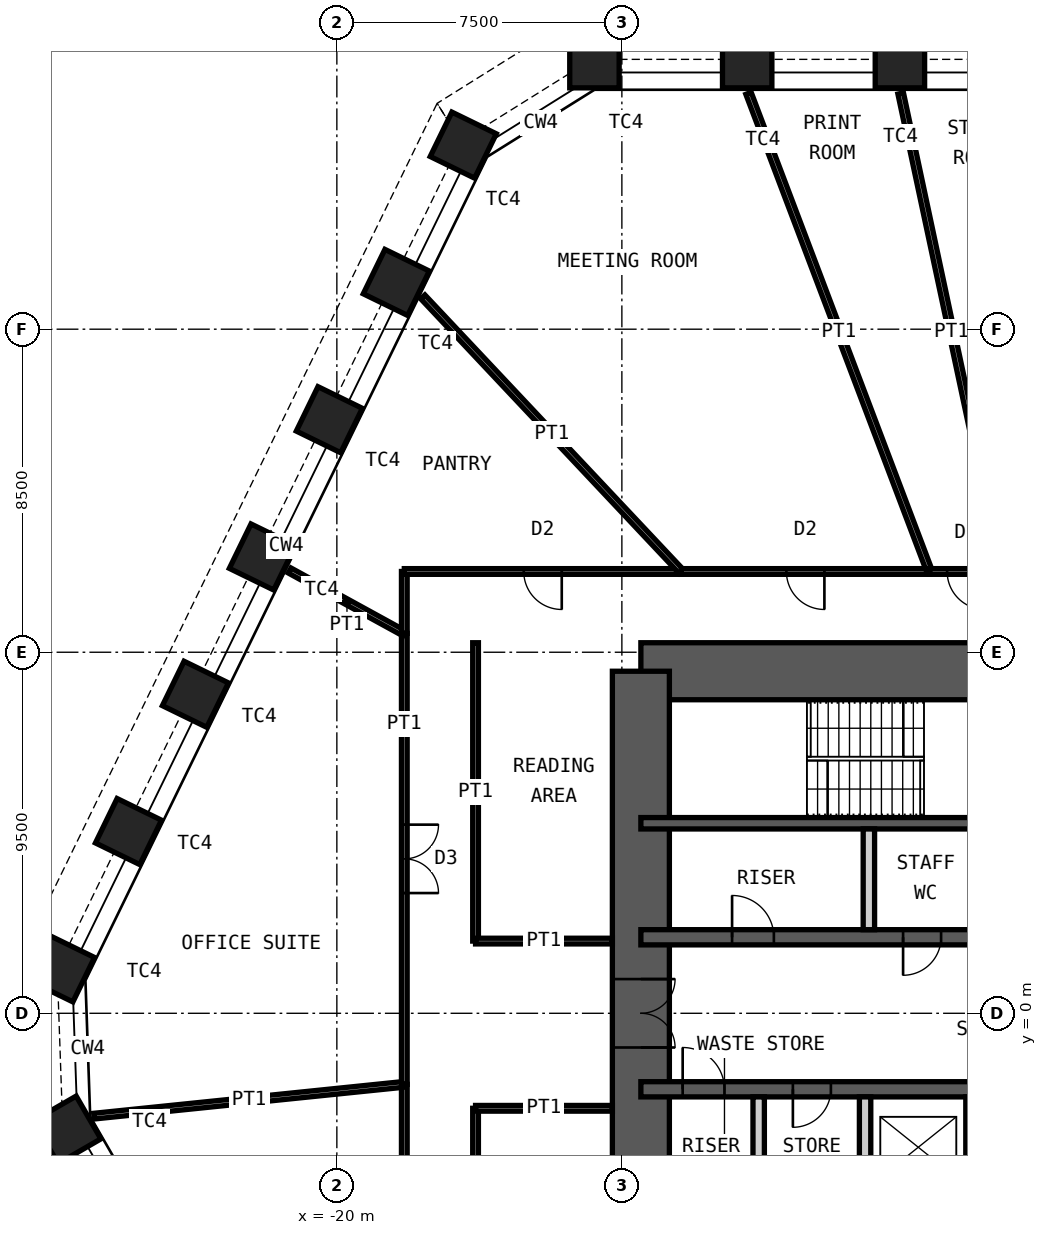
"""IFC4 building model, lengths in metres.
Left out: names, types, materials, properties, quantities, classifications, styles, units other than length and angle.
Written with IfcOpenShell. Run it as: python <this file> out.ifc"""

import sys

from ifc_helpers import new_model, si_unit, direction, frame, frame_2d, origin, origin_2d, place, context, subcontext, project, spatial, rectangle, hollow_rectangle, extrude, element, fill, save


model = new_model("IFC4")
c1 = context("Model", 3, precision=1e-05, world=origin(), true_north=direction((0.0, 1.0)))
c2 = subcontext(c1, "Body", "Model", "MODEL_VIEW")
j1 = project(units=[si_unit("LENGTHUNIT", "METRE"), si_unit("PLANEANGLEUNIT", "RADIAN")], contexts=[c1])
p1 = place(None, origin())
s1 = spatial("IfcSite", under=j1, at=p1, CompositionType="ELEMENT")
p2 = place(p1, origin())
s2 = spatial("IfcBuilding", under=s1, at=p2, CompositionType="ELEMENT")
p3 = place(p2, frame((0.0, 0.0, 140.8)))
s3 = spatial("IfcBuildingStorey", under=s2, at=p3, CompositionType="ELEMENT", Elevation=140.8)
for number, where, z_axis, x_axis in (
    (1, (-13.222, 25.0, 0.0), (0.0, 0.0, 1.0), (-1.0, 0.0, 0.0)),
    (2, (-9.203, 25.0, 0.0), (0.0, 0.0, 1.0), (-1.0, 0.0, 0.0)),
    (3, (-5.184, 25.0, 0.0), (0.0, 0.0, 1.0), (-1.0, 0.0, 0.0)),
    (4, (-27.097, -3.067, 0.0), (0.0, 0.0, 1.0), (0.5, -0.866, 0.0)),
    (5, (-27.245, 1.169, 0.0), (0.0, 0.0, 1.0), (-0.438, -0.899, 0.0)),
    (6, (-25.483, 4.781, 0.0), (0.0, 0.0, 1.0), (-0.438, -0.899, 0.0)),
    (7, (-23.721, 8.394, 0.0), (0.0, 0.0, 1.0), (-0.438, -0.899, 0.0)),
    (8, (-21.959, 12.006, 0.0), (0.0, 0.0, 1.0), (-0.438, -0.899, 0.0)),
    (9, (-20.198, 15.618, 0.0), (0.0, 0.0, 1.0), (-0.438, -0.899, 0.0)),
    (10, (-18.436, 19.23, 0.0), (0.0, 0.0, 1.0), (-0.438, -0.899, 0.0)),
    (11, (-16.674, 22.843, 0.0), (0.0, 0.0, 1.0), (-0.438, -0.899, 0.0)),
):
    element("IfcColumn", number, at=place(p3, frame(where, z_axis=z_axis, x_axis=x_axis)), inside=s3, PredefinedType="COLUMN", context=c2, shape_type="SweptSolid", body=[
        extrude(hollow_rectangle(XDim=1.3, YDim=1.3, WallThickness=0.1, at=origin_2d()), origin(), (0.0, 0.0, 1.0), 4.2),
    ])
p4 = place(p3, frame((-12.0, 9.0, 0.0), z_axis=(0.0, 0.0, 1.0), x_axis=(1.0, 0.0, 0.0)))
e12 = element("IfcWall", 12, at=p4, inside=s3, PredefinedType="SHEAR", context=c2, shape_type="SweptSolid", body=[
    extrude(rectangle(XDim=24.0, YDim=1.5, at=frame_2d((12.0, 0.0))), origin(), (0.0, 0.0, 1.0), 4.2),
])
p5 = place(p4, frame((10.4, 0.0, 0.0)))
e13 = element("IfcOpeningElement", 13, at=p5, cuts=e12, PredefinedType="OPENING", context=c2, shape_type="SweptSolid", body=[
    extrude(rectangle(XDim=1.0, YDim=2.1, at=frame_2d((0.5, 1.05))), frame((0.0, 0.76, 0.0), z_axis=(0.0, -1.0, 0.0), x_axis=(1.0, 0.0, 0.0)), (0.0, 0.0, 1.0), 1.52),
])
p6 = place(p4, frame((17.6, 0.0, 0.0)))
e14 = element("IfcOpeningElement", 14, at=p6, cuts=e12, PredefinedType="OPENING", context=c2, shape_type="SweptSolid", body=[
    extrude(rectangle(XDim=0.9, YDim=2.1, at=frame_2d((0.45, 1.05))), frame((0.0, 0.76, 0.0), z_axis=(0.0, -1.0, 0.0), x_axis=(1.0, 0.0, 0.0)), (0.0, 0.0, 1.0), 1.52),
])
p7 = place(p4, frame((21.9, 0.0, 0.0)))
e15 = element("IfcOpeningElement", 15, at=p7, cuts=e12, PredefinedType="OPENING", context=c2, shape_type="SweptSolid", body=[
    extrude(rectangle(XDim=0.9, YDim=2.1, at=frame_2d((0.45, 1.05))), frame((0.0, 0.76, 0.0), z_axis=(0.0, -1.0, 0.0), x_axis=(1.0, 0.0, 0.0)), (0.0, 0.0, 1.0), 1.52),
])
p8 = place(p3, frame((-12.0, -9.0, 0.0), z_axis=(0.0, 0.0, 1.0), x_axis=(0.0, 1.0, 0.0)))
e16 = element("IfcWall", 16, at=p8, inside=s3, PredefinedType="SHEAR", context=c2, shape_type="SweptSolid", body=[
    extrude(rectangle(XDim=18.0, YDim=1.5, at=frame_2d((9.0, 0.0))), origin(), (0.0, 0.0, 1.0), 4.2),
])
p9 = place(p8, frame((8.1, 0.0, 0.0)))
e17 = element("IfcOpeningElement", 17, at=p9, cuts=e16, PredefinedType="OPENING", context=c2, shape_type="SweptSolid", body=[
    extrude(rectangle(XDim=1.8, YDim=2.1, at=frame_2d((0.9, 1.05))), frame((0.0, 0.76, 0.0), z_axis=(0.0, -1.0, 0.0), x_axis=(1.0, 0.0, 0.0)), (0.0, 0.0, 1.0), 1.52),
])
p10 = place(p3, frame((-12.0, 5.0, 0.0), z_axis=(0.0, 0.0, 1.0), x_axis=(1.0, 0.0, 0.0)))
e18 = element("IfcWall", 18, at=p10, inside=s3, PredefinedType="SHEAR", context=c2, shape_type="SweptSolid", body=[
    extrude(rectangle(XDim=24.0, YDim=0.3, at=frame_2d((12.0, 0.0))), origin(), (0.0, 0.0, 1.0), 4.2),
])
p11 = place(p3, frame((-12.0, 2.0, 0.0), z_axis=(0.0, 0.0, 1.0), x_axis=(1.0, 0.0, 0.0)))
e19 = element("IfcWall", 19, at=p11, inside=s3, PredefinedType="SHEAR", context=c2, shape_type="SweptSolid", body=[
    extrude(rectangle(XDim=24.0, YDim=0.4, at=frame_2d((12.0, 0.0))), origin(), (0.0, 0.0, 1.0), 4.2),
])
p12 = place(p11, frame((2.4, 0.0, 0.0)))
e20 = element("IfcOpeningElement", 20, at=p12, cuts=e19, PredefinedType="OPENING", context=c2, shape_type="SweptSolid", body=[
    extrude(rectangle(XDim=1.1, YDim=2.1, at=frame_2d((0.55, 1.05))), frame((0.0, 0.21, 0.0), z_axis=(0.0, -1.0, 0.0), x_axis=(1.0, 0.0, 0.0)), (0.0, 0.0, 1.0), 0.42),
])
p13 = place(p11, frame((22.0, 0.0, 0.0)))
e21 = element("IfcOpeningElement", 21, at=p13, cuts=e19, PredefinedType="OPENING", context=c2, shape_type="SweptSolid", body=[
    extrude(rectangle(XDim=1.1, YDim=2.1, at=frame_2d((0.55, 1.05))), frame((0.0, 0.21, 0.0), z_axis=(0.0, -1.0, 0.0), x_axis=(1.0, 0.0, 0.0)), (0.0, 0.0, 1.0), 0.42),
])
p14 = place(p11, frame((10.15, 0.0, 0.0)))
e22 = element("IfcOpeningElement", 22, at=p14, cuts=e19, PredefinedType="OPENING", context=c2, shape_type="SweptSolid", body=[
    extrude(rectangle(XDim=1.0, YDim=2.1, at=frame_2d((0.5, 1.05))), frame((0.0, 0.21, 0.0), z_axis=(0.0, -1.0, 0.0), x_axis=(1.0, 0.0, 0.0)), (0.0, 0.0, 1.0), 0.42),
])
p15 = place(p11, frame((6.9, 0.0, 0.0)))
e23 = element("IfcOpeningElement", 23, at=p15, cuts=e19, PredefinedType="OPENING", context=c2, shape_type="SweptSolid", body=[
    extrude(rectangle(XDim=1.0, YDim=2.1, at=frame_2d((0.5, 1.05))), frame((0.0, 0.21, 0.0), z_axis=(0.0, -1.0, 0.0), x_axis=(1.0, 0.0, 0.0)), (0.0, 0.0, 1.0), 0.42),
])
p16 = place(p11, frame((13.35, 0.0, 0.0)))
e24 = element("IfcOpeningElement", 24, at=p16, cuts=e19, PredefinedType="OPENING", context=c2, shape_type="SweptSolid", body=[
    extrude(rectangle(XDim=1.1, YDim=2.4, at=frame_2d((0.55, 1.2))), frame((0.0, 0.21, 0.0), z_axis=(0.0, -1.0, 0.0), x_axis=(1.0, 0.0, 0.0)), (0.0, 0.0, 1.0), 0.42),
])
p17 = place(p11, frame((16.15, 0.0, 0.0)))
e25 = element("IfcOpeningElement", 25, at=p17, cuts=e19, PredefinedType="OPENING", context=c2, shape_type="SweptSolid", body=[
    extrude(rectangle(XDim=1.1, YDim=2.4, at=frame_2d((0.55, 1.2))), frame((0.0, 0.21, 0.0), z_axis=(0.0, -1.0, 0.0), x_axis=(1.0, 0.0, 0.0)), (0.0, 0.0, 1.0), 0.42),
])
p18 = place(p11, frame((18.95, 0.0, 0.0)))
e26 = element("IfcOpeningElement", 26, at=p18, cuts=e19, PredefinedType="OPENING", context=c2, shape_type="SweptSolid", body=[
    extrude(rectangle(XDim=1.1, YDim=2.4, at=frame_2d((0.55, 1.2))), frame((0.0, 0.21, 0.0), z_axis=(0.0, -1.0, 0.0), x_axis=(1.0, 0.0, 0.0)), (0.0, 0.0, 1.0), 0.42),
])
p19 = place(p3, frame((-12.0, -2.0, 0.0), z_axis=(0.0, 0.0, 1.0), x_axis=(1.0, 0.0, 0.0)))
e27 = element("IfcWall", 27, at=p19, inside=s3, PredefinedType="SHEAR", context=c2, shape_type="SweptSolid", body=[
    extrude(rectangle(XDim=24.0, YDim=0.4, at=frame_2d((12.0, 0.0))), origin(), (0.0, 0.0, 1.0), 4.2),
])
p20 = place(p19, frame((1.1, 0.0, 0.0)))
e28 = element("IfcOpeningElement", 28, at=p20, cuts=e27, PredefinedType="OPENING", context=c2, shape_type="SweptSolid", body=[
    extrude(rectangle(XDim=1.1, YDim=2.1, at=frame_2d((0.55, 1.05))), frame((0.0, 0.21, 0.0), z_axis=(0.0, -1.0, 0.0), x_axis=(1.0, 0.0, 0.0)), (0.0, 0.0, 1.0), 0.42),
])
p21 = place(p19, frame((13.55, 0.0, 0.0)))
e29 = element("IfcOpeningElement", 29, at=p21, cuts=e27, PredefinedType="OPENING", context=c2, shape_type="SweptSolid", body=[
    extrude(rectangle(XDim=1.1, YDim=2.1, at=frame_2d((0.55, 1.05))), frame((0.0, 0.21, 0.0), z_axis=(0.0, -1.0, 0.0), x_axis=(1.0, 0.0, 0.0)), (0.0, 0.0, 1.0), 0.42),
])
p22 = place(p19, frame((20.7, 0.0, 0.0)))
e30 = element("IfcOpeningElement", 30, at=p22, cuts=e27, PredefinedType="OPENING", context=c2, shape_type="SweptSolid", body=[
    extrude(rectangle(XDim=1.1, YDim=2.1, at=frame_2d((0.55, 1.05))), frame((0.0, 0.21, 0.0), z_axis=(0.0, -1.0, 0.0), x_axis=(1.0, 0.0, 0.0)), (0.0, 0.0, 1.0), 0.42),
])
p23 = place(p19, frame((4.0, 0.0, 0.0)))
e31 = element("IfcOpeningElement", 31, at=p23, cuts=e27, PredefinedType="OPENING", context=c2, shape_type="SweptSolid", body=[
    extrude(rectangle(XDim=1.0, YDim=2.1, at=frame_2d((0.5, 1.05))), frame((0.0, 0.21, 0.0), z_axis=(0.0, -1.0, 0.0), x_axis=(1.0, 0.0, 0.0)), (0.0, 0.0, 1.0), 0.42),
])
for number, where, z_axis, x_axis in (
    (32, (-6.0, 2.2, 0.0), (0.0, 0.0, 1.0), (0.0, 1.0, 0.0)),
    (33, (-8.9, -4.85, 0.0), (0.0, 0.0, 1.0), (0.0, 1.0, 0.0)),
    (34, (-6.1, -4.85, 0.0), (0.0, 0.0, 1.0), (0.0, 1.0, 0.0)),
    (35, (-3.3, -4.85, 0.0), (0.0, 0.0, 1.0), (0.0, 1.0, 0.0)),
):
    element("IfcWall", number, at=place(p3, frame(where, z_axis=z_axis, x_axis=x_axis)), inside=s3, PredefinedType="PARTITIONING", context=c2, shape_type="SweptSolid", body=[
        extrude(rectangle(XDim=2.65, YDim=0.3, at=frame_2d((1.325, 0.0))), origin(), (0.0, 0.0, 1.0), 3.98),
    ])
p24 = place(p3, frame((-18.225, -11.625, 0.0), z_axis=(0.0, 0.0, 1.0), x_axis=(0.0, 1.0, 0.0)))
e36 = element("IfcWall", 36, at=p24, inside=s3, PredefinedType="PARTITIONING", context=c2, shape_type="SweptSolid", body=[
    extrude(rectangle(XDim=9.756, YDim=0.15, at=frame_2d((4.878, 0.0))), origin(), (0.0, 0.0, 1.0), 4.03),
])
p25 = place(p24, frame((3.978, 0.0, 0.0)))
e37 = element("IfcOpeningElement", 37, at=p25, cuts=e36, PredefinedType="OPENING", context=c2, shape_type="SweptSolid", body=[
    extrude(rectangle(XDim=1.8, YDim=2.4, at=frame_2d((0.9, 1.2))), frame((0.0, 0.085, 0.0), z_axis=(0.0, -1.0, 0.0), x_axis=(1.0, 0.0, 0.0)), (0.0, 0.0, 1.0), 0.17),
])
p26 = place(p3, frame((-26.391, -2.706, 0.0), z_axis=(0.0, 0.0, 1.0), x_axis=(0.994783450774, 0.102009245004, 0.0)))
e38 = element("IfcWall", 38, at=p26, inside=s3, PredefinedType="PARTITIONING", context=c2, shape_type="SweptSolid", body=[
    extrude(rectangle(XDim=8.209, YDim=0.15, at=frame_2d((4.104, 0.0))), origin(), (0.0, 0.0, 1.0), 2.93),
])
p27 = place(p3, frame((-18.225, -1.869, 0.0), z_axis=(0.0, 0.0, 1.0), x_axis=(0.0, 1.0, 0.0)))
e39 = element("IfcWall", 39, at=p27, inside=s3, PredefinedType="PARTITIONING", context=c2, shape_type="SweptSolid", body=[
    extrude(rectangle(XDim=11.865, YDim=0.15, at=frame_2d((5.932, 0.0))), origin(), (0.0, 0.0, 1.0), 4.03),
])
p28 = place(p27, frame((5.032, 0.0, 0.0)))
e40 = element("IfcOpeningElement", 40, at=p28, cuts=e39, PredefinedType="OPENING", context=c2, shape_type="SweptSolid", body=[
    extrude(rectangle(XDim=1.8, YDim=2.4, at=frame_2d((0.9, 1.2))), frame((0.0, 0.085, 0.0), z_axis=(0.0, -1.0, 0.0), x_axis=(1.0, 0.0, 0.0)), (0.0, 0.0, 1.0), 0.17),
])
p29 = place(p3, frame((-21.242, 11.651, 0.0), z_axis=(0.0, 0.0, 1.0), x_axis=(0.876768023831, -0.480913539409, 0.0)))
e41 = element("IfcWall", 41, at=p29, inside=s3, PredefinedType="PARTITIONING", context=c2, shape_type="SweptSolid", body=[
    extrude(rectangle(XDim=3.441, YDim=0.15, at=frame_2d((1.721, 0.0))), origin(), (0.0, 0.0, 1.0), 3.33),
])
p30 = place(p3, frame((-18.225, 9.996, 0.0), z_axis=(0.0, 0.0, 1.0), x_axis=(0.0, 1.0, 0.0)))
e42 = element("IfcWall", 42, at=p30, inside=s3, PredefinedType="PARTITIONING", context=c2, shape_type="SweptSolid", body=[
    extrude(rectangle(XDim=1.629, YDim=0.15, at=frame_2d((0.814, 0.0))), origin(), (0.0, 0.0, 1.0), 4.03),
])
p31 = place(p3, frame((-18.225, 11.625, 0.0), z_axis=(0.0, 0.0, 1.0), x_axis=(1.0, 0.0, 0.0)))
e43 = element("IfcWall", 43, at=p31, inside=s3, PredefinedType="PARTITIONING", context=c2, shape_type="SweptSolid", body=[
    extrude(rectangle(XDim=7.286, YDim=0.15, at=frame_2d((3.643, 0.0))), origin(), (0.0, 0.0, 1.0), 4.03),
])
p32 = place(p31, frame((3.143, 0.0, 0.0)))
e44 = element("IfcOpeningElement", 44, at=p32, cuts=e43, PredefinedType="OPENING", context=c2, shape_type="SweptSolid", body=[
    extrude(rectangle(XDim=1.0, YDim=2.4, at=frame_2d((0.5, 1.2))), frame((0.0, 0.085, 0.0), z_axis=(0.0, -1.0, 0.0), x_axis=(1.0, 0.0, 0.0)), (0.0, 0.0, 1.0), 0.17),
])
p33 = place(p3, frame((-17.738, 18.851, 0.0), z_axis=(0.0, 0.0, 1.0), x_axis=(0.685286406267, -0.728273672039, 0.0)))
e45 = element("IfcWall", 45, at=p33, inside=s3, PredefinedType="PARTITIONING", context=c2, shape_type="SweptSolid", body=[
    extrude(rectangle(XDim=9.922, YDim=0.15, at=frame_2d((4.961, 0.0))), origin(), (0.0, 0.0, 1.0), 3.33),
])
p34 = place(p3, frame((-10.939, 11.625, 0.0), z_axis=(0.0, 0.0, 1.0), x_axis=(1.0, 0.0, 0.0)))
e46 = element("IfcWall", 46, at=p34, inside=s3, PredefinedType="PARTITIONING", context=c2, shape_type="SweptSolid", body=[
    extrude(rectangle(XDim=6.536, YDim=0.15, at=frame_2d((3.268, 0.0))), origin(), (0.0, 0.0, 1.0), 4.03),
])
p35 = place(p34, frame((2.768, 0.0, 0.0)))
e47 = element("IfcOpeningElement", 47, at=p35, cuts=e46, PredefinedType="OPENING", context=c2, shape_type="SweptSolid", body=[
    extrude(rectangle(XDim=1.0, YDim=2.4, at=frame_2d((0.5, 1.2))), frame((0.0, 0.085, 0.0), z_axis=(0.0, -1.0, 0.0), x_axis=(1.0, 0.0, 0.0)), (0.0, 0.0, 1.0), 0.17),
])
p36 = place(p3, frame((-9.167, 24.207, 0.0), z_axis=(0.0, 0.0, 1.0), x_axis=(0.354156368181, -0.935186220427, 0.0)))
e48 = element("IfcWall", 48, at=p36, inside=s3, PredefinedType="PARTITIONING", context=c2, shape_type="SweptSolid", body=[
    extrude(rectangle(XDim=13.454, YDim=0.15, at=frame_2d((6.727, 0.0))), origin(), (0.0, 0.0, 1.0), 3.33),
])
p37 = place(p3, frame((-4.403, 11.625, 0.0), z_axis=(0.0, 0.0, 1.0), x_axis=(1.0, 0.0, 0.0)))
e49 = element("IfcWall", 49, at=p37, inside=s3, PredefinedType="PARTITIONING", context=c2, shape_type="SweptSolid", body=[
    extrude(rectangle(XDim=1.923, YDim=0.15, at=frame_2d((0.961, 0.0))), origin(), (0.0, 0.0, 1.0), 4.03),
])
p38 = place(p37, frame((0.461, 0.0, 0.0)))
e50 = element("IfcOpeningElement", 50, at=p38, cuts=e49, PredefinedType="OPENING", context=c2, shape_type="SweptSolid", body=[
    extrude(rectangle(XDim=1.0, YDim=2.4, at=frame_2d((0.5, 1.2))), frame((0.0, 0.085, 0.0), z_axis=(0.0, -1.0, 0.0), x_axis=(1.0, 0.0, 0.0)), (0.0, 0.0, 1.0), 0.17),
])
p39 = place(p3, frame((-5.163, 24.202, 0.0), z_axis=(0.0, 0.0, 1.0), x_axis=(0.208618861146, -0.977997019819, 0.0)))
e51 = element("IfcWall", 51, at=p39, inside=s3, PredefinedType="PARTITIONING", context=c2, shape_type="SweptSolid", body=[
    extrude(rectangle(XDim=12.86, YDim=0.15, at=frame_2d((6.43, 0.0))), origin(), (0.0, 0.0, 1.0), 3.33),
])
p40 = place(p3, frame((-16.35, 1.9, 0.0), z_axis=(0.0, 0.0, 1.0), x_axis=(0.0, 1.0, 0.0)))
e52 = element("IfcWall", 52, at=p40, inside=s3, PredefinedType="PARTITIONING", context=c2, shape_type="SweptSolid", body=[
    extrude(rectangle(XDim=7.85, YDim=0.15, at=frame_2d((3.925, 0.0))), origin(), (0.0, 0.0, 1.0), 4.03),
])
p41 = place(p3, frame((-12.75, 1.9, 0.0), z_axis=(0.0, 0.0, 1.0), x_axis=(-1.0, 0.0, 0.0)))
e53 = element("IfcWall", 53, at=p41, inside=s3, PredefinedType="PARTITIONING", context=c2, shape_type="SweptSolid", body=[
    extrude(rectangle(XDim=3.6, YDim=0.15, at=frame_2d((1.8, 0.0))), origin(), (0.0, 0.0, 1.0), 3.33),
])
p42 = place(p3, frame((-16.35, -9.75, 0.0), z_axis=(0.0, 0.0, 1.0), x_axis=(0.0, 1.0, 0.0)))
e54 = element("IfcWall", 54, at=p42, inside=s3, PredefinedType="PARTITIONING", context=c2, shape_type="SweptSolid", body=[
    extrude(rectangle(XDim=7.25, YDim=0.15, at=frame_2d((3.625, 0.0))), origin(), (0.0, 0.0, 1.0), 4.03),
])
p43 = place(p3, frame((-12.75, -2.5, 0.0), z_axis=(0.0, 0.0, 1.0), x_axis=(-1.0, 0.0, 0.0)))
e55 = element("IfcWall", 55, at=p43, inside=s3, PredefinedType="PARTITIONING", context=c2, shape_type="SweptSolid", body=[
    extrude(rectangle(XDim=3.6, YDim=0.15, at=frame_2d((1.8, 0.0))), origin(), (0.0, 0.0, 1.0), 3.33),
])
p44 = place(p12, origin())
e56 = element("IfcDoor", 56, at=p44, inside=s3, OperationType="SINGLE_SWING_RIGHT", PredefinedType="DOOR", context=c2, shape_type="SweptSolid", body=[
    extrude(rectangle(XDim=1.1, YDim=2.1, at=frame_2d((0.55, 1.05))), frame((0.0, 0.025, 0.0), z_axis=(0.0, -1.0, 0.0), x_axis=(1.0, 0.0, 0.0)), (0.0, 0.0, 1.0), 0.05),
])
fill(e20, e56)
p45 = place(p20, origin())
e57 = element("IfcDoor", 57, at=p45, inside=s3, OperationType="SINGLE_SWING_RIGHT", PredefinedType="DOOR", context=c2, shape_type="SweptSolid", body=[
    extrude(rectangle(XDim=1.1, YDim=2.1, at=frame_2d((0.55, 1.05))), frame((0.0, 0.025, 0.0), z_axis=(0.0, -1.0, 0.0), x_axis=(1.0, 0.0, 0.0)), (0.0, 0.0, 1.0), 0.05),
])
fill(e28, e57)
p46 = place(p9, origin())
e58 = element("IfcDoor", 58, at=p46, inside=s3, OperationType="DOUBLE_DOOR_DOUBLE_SWING", PredefinedType="DOOR", context=c2, shape_type="SweptSolid", body=[
    extrude(rectangle(XDim=1.8, YDim=2.1, at=frame_2d((0.9, 1.05))), frame((0.0, 0.025, 0.0), z_axis=(0.0, -1.0, 0.0), x_axis=(1.0, 0.0, 0.0)), (0.0, 0.0, 1.0), 0.05),
])
fill(e17, e58)
p47 = place(p15, origin())
e59 = element("IfcDoor", 59, at=p47, inside=s3, OperationType="SINGLE_SWING_LEFT", PredefinedType="DOOR", context=c2, shape_type="SweptSolid", body=[
    extrude(rectangle(XDim=1.0, YDim=2.1, at=frame_2d((0.5, 1.05))), frame((0.0, 0.025, 0.0), z_axis=(0.0, -1.0, 0.0), x_axis=(1.0, 0.0, 0.0)), (0.0, 0.0, 1.0), 0.05),
])
fill(e23, e59)
p48 = place(p23, origin())
e60 = element("IfcDoor", 60, at=p48, inside=s3, OperationType="SINGLE_SWING_LEFT", PredefinedType="DOOR", context=c2, shape_type="SweptSolid", body=[
    extrude(rectangle(XDim=1.0, YDim=2.1, at=frame_2d((0.5, 1.05))), frame((0.0, 0.025, 0.0), z_axis=(0.0, -1.0, 0.0), x_axis=(1.0, 0.0, 0.0)), (0.0, 0.0, 1.0), 0.05),
])
fill(e31, e60)
p49 = place(p28, origin())
e61 = element("IfcDoor", 61, at=p49, inside=s3, OperationType="DOUBLE_DOOR_DOUBLE_SWING", PredefinedType="DOOR", context=c2, shape_type="SweptSolid", body=[
    extrude(rectangle(XDim=1.8, YDim=2.4, at=frame_2d((0.9, 1.2))), frame((0.0, 0.025, 0.0), z_axis=(0.0, -1.0, 0.0), x_axis=(1.0, 0.0, 0.0)), (0.0, 0.0, 1.0), 0.05),
])
fill(e40, e61)
p50 = place(p32, origin())
e62 = element("IfcDoor", 62, at=p50, inside=s3, OperationType="SINGLE_SWING_RIGHT", PredefinedType="DOOR", context=c2, shape_type="SweptSolid", body=[
    extrude(rectangle(XDim=1.0, YDim=2.4, at=frame_2d((0.5, 1.2))), frame((0.0, 0.025, 0.0), z_axis=(0.0, -1.0, 0.0), x_axis=(1.0, 0.0, 0.0)), (0.0, 0.0, 1.0), 0.05),
])
fill(e44, e62)
p51 = place(p35, origin())
e63 = element("IfcDoor", 63, at=p51, inside=s3, OperationType="SINGLE_SWING_RIGHT", PredefinedType="DOOR", context=c2, shape_type="SweptSolid", body=[
    extrude(rectangle(XDim=1.0, YDim=2.4, at=frame_2d((0.5, 1.2))), frame((0.0, 0.025, 0.0), z_axis=(0.0, -1.0, 0.0), x_axis=(1.0, 0.0, 0.0)), (0.0, 0.0, 1.0), 0.05),
])
fill(e47, e63)
p52 = place(p38, origin())
e64 = element("IfcDoor", 64, at=p52, inside=s3, OperationType="SINGLE_SWING_RIGHT", PredefinedType="DOOR", context=c2, shape_type="SweptSolid", body=[
    extrude(rectangle(XDim=1.0, YDim=2.4, at=frame_2d((0.5, 1.2))), frame((0.0, 0.025, 0.0), z_axis=(0.0, -1.0, 0.0), x_axis=(1.0, 0.0, 0.0)), (0.0, 0.0, 1.0), 0.05),
])
fill(e50, e64)
save(model, sys.argv[1])
